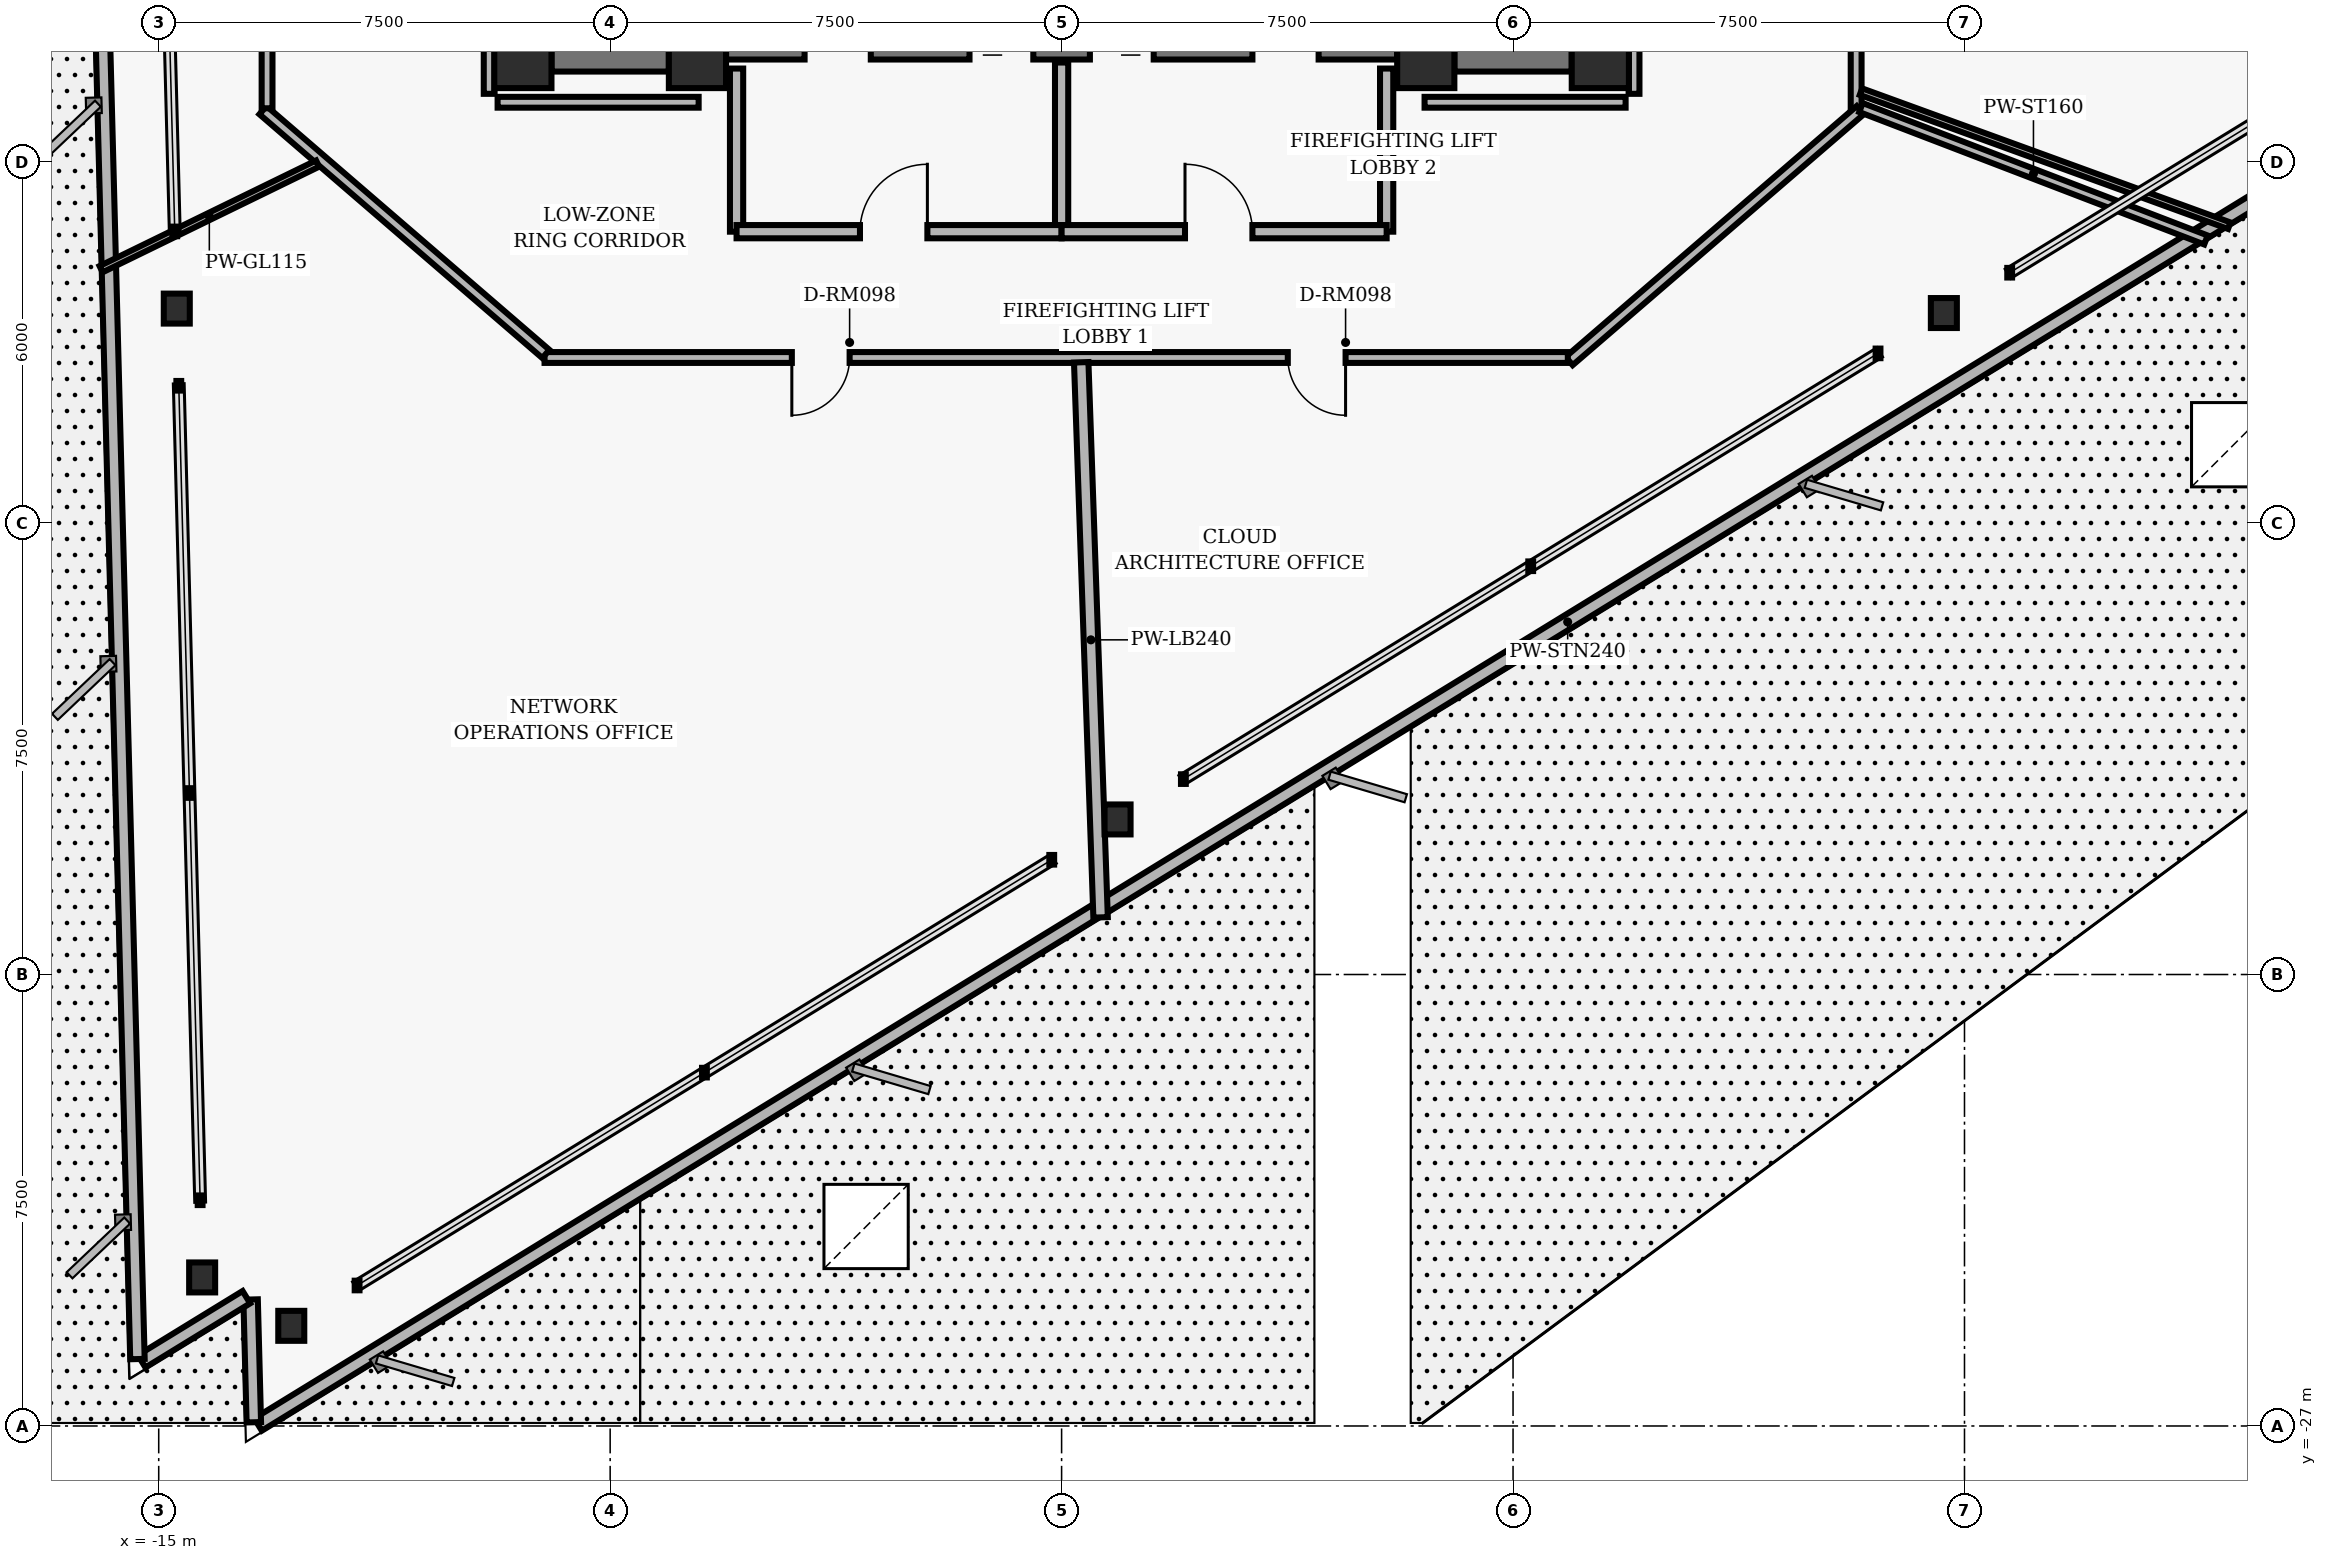
"""IFC4 building model, lengths in metres.
Left out: names, types, materials, properties, quantities, classifications, styles, units other than length and angle.
Written with IfcOpenShell. Run it as: python <this file> out.ifc"""

import sys

from ifc_helpers import new_model, si_unit, direction, frame, frame_2d, origin, origin_2d, place, context, subcontext, project, spatial, rectangle, hollow_rectangle, i_section, extrude, element, fill, save


model = new_model("IFC4")
c1 = context("Model", 3, precision=1e-05, world=origin(), true_north=direction((0.0, 1.0)))
c2 = subcontext(c1, "Body", "Model", "MODEL_VIEW")
j1 = project(units=[si_unit("LENGTHUNIT", "METRE"), si_unit("PLANEANGLEUNIT", "RADIAN")], contexts=[c1])
p1 = place(None, origin())
s1 = spatial("IfcSite", under=j1, at=p1, CompositionType="ELEMENT")
p2 = place(p1, origin())
s2 = spatial("IfcBuilding", under=s1, at=p2, CompositionType="ELEMENT")
p3 = place(p2, frame((0.0, 0.0, 18.88)))
s3 = spatial("IfcBuildingStorey", under=s2, at=p3, CompositionType="ELEMENT", Elevation=18.88)
for number, where, z_axis, x_axis in (
    (1, (-6.05, -4.3, 0.0), (0.0, 0.0, 1.0), (1.0, 0.0, 0.0)),
    (2, (6.05, -4.3, 0.0), (0.0, 0.0, 1.0), (1.0, 0.0, 0.0)),
    (3, (-8.95, -4.3, 0.0), (0.0, 0.0, 1.0), (1.0, 0.0, 0.0)),
    (4, (8.95, -4.3, 0.0), (0.0, 0.0, 1.0), (1.0, 0.0, 0.0)),
):
    element("IfcColumn", number, at=place(p3, frame(where, z_axis=z_axis, x_axis=x_axis)), inside=s3, PredefinedType="COLUMN", context=c2, shape_type="SweptSolid", body=[
        extrude(hollow_rectangle(XDim=0.95, YDim=0.95, WallThickness=0.06, InnerFilletRadius=0.02, OuterFilletRadius=0.04, at=origin_2d()), origin(), (0.0, 0.0, 1.0), 3.36),
    ])
p4 = place(p3, frame((-5.575, -4.1, 0.0), z_axis=(0.0, 0.0, 1.0), x_axis=(1.0, 0.0, 0.0)))
e5 = element("IfcWall", 5, at=p4, inside=s3, PredefinedType="SHEAR", context=c2, shape_type="SweptSolid", body=[
    extrude(rectangle(XDim=11.15, YDim=0.4, at=frame_2d((5.575, 0.0))), origin(), (0.0, 0.0, 1.0), 3.098),
])
p5 = place(p4, frame((1.305, 0.0, 0.0)))
e6 = element("IfcOpeningElement", 6, at=p5, cuts=e5, PredefinedType="OPENING", context=c2, shape_type="SweptSolid", body=[
    extrude(rectangle(XDim=1.1, YDim=2.04, at=frame_2d((0.55, 1.02))), frame((0.0, 0.21, 0.0), z_axis=(0.0, -1.0, 0.0), x_axis=(1.0, 0.0, 0.0)), (0.0, 0.0, 1.0), 0.42),
])
p6 = place(p4, frame((8.745, 0.0, 0.0)))
e7 = element("IfcOpeningElement", 7, at=p6, cuts=e5, PredefinedType="OPENING", context=c2, shape_type="SweptSolid", body=[
    extrude(rectangle(XDim=1.1, YDim=2.04, at=frame_2d((0.55, 1.02))), frame((0.0, 0.21, 0.0), z_axis=(0.0, -1.0, 0.0), x_axis=(1.0, 0.0, 0.0)), (0.0, 0.0, 1.0), 0.42),
])
p7 = place(p4, frame((4.045, 0.0, 0.0)))
e8 = element("IfcOpeningElement", 8, at=p7, cuts=e5, PredefinedType="OPENING", context=c2, shape_type="SweptSolid", body=[
    extrude(rectangle(XDim=1.06, YDim=2.04, at=frame_2d((0.53, 1.02))), frame((0.0, 0.21, 0.0), z_axis=(0.0, -1.0, 0.0), x_axis=(1.0, 0.0, 0.0)), (0.0, 0.0, 1.0), 0.42),
])
p8 = place(p4, frame((6.045, 0.0, 0.0)))
e9 = element("IfcOpeningElement", 9, at=p8, cuts=e5, PredefinedType="OPENING", context=c2, shape_type="SweptSolid", body=[
    extrude(rectangle(XDim=1.06, YDim=2.04, at=frame_2d((0.53, 1.02))), frame((0.0, 0.21, 0.0), z_axis=(0.0, -1.0, 0.0), x_axis=(1.0, 0.0, 0.0)), (0.0, 0.0, 1.0), 0.42),
])
for number, where, z_axis, x_axis in (
    (10, (-8.475, -4.3, 0.0), (0.0, 0.0, 1.0), (1.0, 0.0, 0.0)),
    (11, (6.525, -4.3, 0.0), (0.0, 0.0, 1.0), (1.0, 0.0, 0.0)),
):
    element("IfcWall", number, at=place(p3, frame(where, z_axis=z_axis, x_axis=x_axis)), inside=s3, PredefinedType="SHEAR", context=c2, shape_type="SweptSolid", body=[
        extrude(rectangle(XDim=1.95, YDim=0.4, at=frame_2d((0.975, 0.0))), origin(), (0.0, 0.0, 1.0), 3.098),
    ])
for number, where, z_axis, x_axis in (
    (12, (-14.7, -8.438, 0.0), (0.0, 0.0, 1.0), (1.0, 0.0, 0.0)),
    (13, (-14.279, -24.532, 0.0), (0.0, 0.0, 1.0), (1.0, 0.0, 0.0)),
    (14, (-12.798, -25.336, 0.0), (0.0, 0.0, 1.0), (1.0, 0.0, 0.0)),
    (15, (0.93, -16.924, 0.0), (0.0, 0.0, 1.0), (1.0, 0.0, 0.0)),
    (16, (14.657, -8.512, 0.0), (0.0, 0.0, 1.0), (1.0, 0.0, 0.0)),
):
    element("IfcColumn", number, at=place(p3, frame(where, z_axis=z_axis, x_axis=x_axis)), inside=s3, PredefinedType="COLUMN", context=c2, shape_type="SweptSolid", body=[
        extrude(i_section(OverallWidth=0.432, OverallDepth=0.498, WebThickness=0.056, FlangeThickness=0.089, FilletRadius=0.025, at=origin_2d()), origin(), (0.0, 0.0, 1.0), 3.36),
    ])
p9 = place(p3, frame((30.165, -0.311, 0.0), z_axis=(0.0, 0.0, 1.0), x_axis=(-0.852639202063, -0.522500135029, 0.0)))
e17 = element("IfcWall", 17, at=p9, inside=s3, PredefinedType="PARAPET", context=c2, shape_type="SweptSolid", body=[
    extrude(rectangle(XDim=51.035, YDim=0.24, at=frame_2d((25.518, 0.0))), origin(), (0.0, 0.0, 1.0), 1.65),
])
for number, where, z_axis, x_axis in (
    (18, (-13.42, -26.938, 0.0), (0.0, 0.0, 1.0), (-0.026, 1.0, 0.0)),
    (19, (-13.544, -24.861, 0.0), (0.0, 0.0, 1.0), (-0.853, -0.522, 0.0)),
):
    element("IfcWall", number, at=place(p3, frame(where, z_axis=z_axis, x_axis=x_axis)), inside=s3, PredefinedType="PARAPET", context=c2, shape_type="SweptSolid", body=[
        extrude(rectangle(XDim=2.04, YDim=0.24, at=frame_2d((1.02, 0.0))), origin(), (0.0, 0.0, 1.0), 1.65),
    ])
p10 = place(p3, frame((-15.354, -25.888, 0.0), z_axis=(0.0, 0.0, 1.0), x_axis=(-0.026174886222, 0.999657378971, 0.0)))
e20 = element("IfcWall", 20, at=p10, inside=s3, PredefinedType="PARAPET", context=c2, shape_type="SweptSolid", body=[
    extrude(rectangle(XDim=50.955, YDim=0.24, at=frame_2d((25.478, 0.0))), origin(), (0.0, 0.0, 1.0), 1.65),
])
for number, where, z_axis, x_axis in (
    (21, (-5.4, -7.16, 0.0), (0.0, 0.0, 1.0), (0.0, 1.0, 0.0)),
    (22, (5.4, -7.16, 0.0), (0.0, 0.0, 1.0), (0.0, 1.0, 0.0)),
):
    element("IfcWall", number, at=place(p3, frame(where, z_axis=z_axis, x_axis=x_axis)), inside=s3, PredefinedType="PARTITIONING", context=c2, shape_type="SweptSolid", body=[
        extrude(rectangle(XDim=2.71, YDim=0.22, at=frame_2d((1.355, 0.0))), origin(), (0.0, 0.0, 1.0), 3.073),
    ])
p11 = place(p3, frame((0.0, -7.16, 0.0), z_axis=(0.0, 0.0, 1.0), x_axis=(0.0, 1.0, 0.0)))
e23 = element("IfcWall", 23, at=p11, inside=s3, PredefinedType="PARTITIONING", context=c2, shape_type="SweptSolid", body=[
    extrude(rectangle(XDim=2.81, YDim=0.22, at=frame_2d((1.405, 0.0))), origin(), (0.0, 0.0, 1.0), 3.073),
])
p12 = place(p3, frame((-5.4, -7.16, 0.0), z_axis=(0.0, 0.0, 1.0), x_axis=(1.0, 0.0, 0.0)))
e24 = element("IfcWall", 24, at=p12, inside=s3, PredefinedType="PARTITIONING", context=c2, shape_type="SweptSolid", body=[
    extrude(rectangle(XDim=5.4, YDim=0.22, at=frame_2d((2.7, 0.0))), origin(), (0.0, 0.0, 1.0), 3.073),
])
p13 = place(p12, frame((2.05, 0.0, 0.0)))
e25 = element("IfcOpeningElement", 25, at=p13, cuts=e24, PredefinedType="OPENING", context=c2, shape_type="SweptSolid", body=[
    extrude(rectangle(XDim=1.12, YDim=2.02, at=frame_2d((0.56, 1.01))), frame((0.0, 0.12, 0.0), z_axis=(0.0, -1.0, 0.0), x_axis=(1.0, 0.0, 0.0)), (0.0, 0.0, 1.0), 0.24),
])
p14 = place(p3, frame((0.0, -7.16, 0.0), z_axis=(0.0, 0.0, 1.0), x_axis=(1.0, 0.0, 0.0)))
e26 = element("IfcWall", 26, at=p14, inside=s3, PredefinedType="PARTITIONING", context=c2, shape_type="SweptSolid", body=[
    extrude(rectangle(XDim=5.4, YDim=0.22, at=frame_2d((2.7, 0.0))), origin(), (0.0, 0.0, 1.0), 3.073),
])
p15 = place(p14, frame((2.05, 0.0, 0.0)))
e27 = element("IfcOpeningElement", 27, at=p15, cuts=e26, PredefinedType="OPENING", context=c2, shape_type="SweptSolid", body=[
    extrude(rectangle(XDim=1.12, YDim=2.02, at=frame_2d((0.56, 1.01))), frame((0.0, 0.12, 0.0), z_axis=(0.0, -1.0, 0.0), x_axis=(1.0, 0.0, 0.0)), (0.0, 0.0, 1.0), 0.24),
])
p16 = place(p3, frame((13.2, 5.11, 0.0), z_axis=(0.0, 0.0, 1.0), x_axis=(0.0, -1.0, 0.0)))
e28 = element("IfcWall", 28, at=p16, inside=s3, PredefinedType="PARTITIONING", context=c2, shape_type="SweptSolid", body=[
    extrude(rectangle(XDim=10.22, YDim=0.18, at=frame_2d((5.11, 0.0))), origin(), (0.0, 0.0, 1.0), 3.073),
])
p17 = place(p16, frame((4.591, 0.0, 0.0)))
e29 = element("IfcOpeningElement", 29, at=p17, cuts=e28, PredefinedType="OPENING", context=c2, shape_type="SweptSolid", body=[
    extrude(rectangle(XDim=1.02, YDim=2.02, at=frame_2d((0.51, 1.01))), frame((0.0, 0.1, 0.0), z_axis=(0.0, -1.0, 0.0), x_axis=(1.0, 0.0, 0.0)), (0.0, 0.0, 1.0), 0.2),
])
p18 = place(p3, frame((13.268, -5.141, 0.0), z_axis=(0.0, 0.0, 1.0), x_axis=(-0.757534501725, -0.65279512766, 0.0)))
e30 = element("IfcWall", 30, at=p18, inside=s3, PredefinedType="PARTITIONING", context=c2, shape_type="SweptSolid", body=[
    extrude(rectangle(XDim=6.385, YDim=0.18, at=frame_2d((3.192, 0.0))), origin(), (0.0, 0.0, 1.0), 2.587),
])
p19 = place(p3, frame((8.41, -9.25, 0.0), z_axis=(0.0, 0.0, 1.0), x_axis=(-1.0, 0.0, 0.0)))
e31 = element("IfcWall", 31, at=p19, inside=s3, PredefinedType="PARTITIONING", context=c2, shape_type="SweptSolid", body=[
    extrude(rectangle(XDim=17.0, YDim=0.18, at=frame_2d((8.5, 0.0))), origin(), (0.0, 0.0, 1.0), 2.587),
])
p20 = place(p19, frame((11.932, 0.0, 0.0)))
e32 = element("IfcOpeningElement", 32, at=p20, cuts=e31, PredefinedType="OPENING", context=c2, shape_type="SweptSolid", body=[
    extrude(rectangle(XDim=0.96, YDim=2.02, at=frame_2d((0.48, 1.01))), frame((0.0, 0.1, 0.0), z_axis=(0.0, -1.0, 0.0), x_axis=(1.0, 0.0, 0.0)), (0.0, 0.0, 1.0), 0.2),
])
p21 = place(p19, frame((3.692, 0.0, 0.0)))
e33 = element("IfcOpeningElement", 33, at=p21, cuts=e31, PredefinedType="OPENING", context=c2, shape_type="SweptSolid", body=[
    extrude(rectangle(XDim=0.96, YDim=2.02, at=frame_2d((0.48, 1.01))), frame((0.0, 0.1, 0.0), z_axis=(0.0, -1.0, 0.0), x_axis=(1.0, 0.0, 0.0)), (0.0, 0.0, 1.0), 0.2),
])
p22 = place(p3, frame((-8.568, -9.191, 0.0), z_axis=(0.0, 0.0, 1.0), x_axis=(-0.757556899173, 0.652769135694, 0.0)))
e34 = element("IfcWall", 34, at=p22, inside=s3, PredefinedType="PARTITIONING", context=c2, shape_type="SweptSolid", body=[
    extrude(rectangle(XDim=6.204, YDim=0.18, at=frame_2d((3.102, 0.0))), origin(), (0.0, 0.0, 1.0), 3.073),
])
p23 = place(p3, frame((-13.2, -5.11, 0.0), z_axis=(0.0, 0.0, 1.0), x_axis=(0.0, 1.0, 0.0)))
e35 = element("IfcWall", 35, at=p23, inside=s3, PredefinedType="PARTITIONING", context=c2, shape_type="SweptSolid", body=[
    extrude(rectangle(XDim=10.22, YDim=0.18, at=frame_2d((5.11, 0.0))), origin(), (0.0, 0.0, 1.0), 2.587),
])
p24 = place(p23, frame((4.361, 0.0, 0.0)))
e36 = element("IfcOpeningElement", 36, at=p24, cuts=e35, PredefinedType="OPENING", context=c2, shape_type="SweptSolid", body=[
    extrude(rectangle(XDim=0.96, YDim=2.02, at=frame_2d((0.48, 1.01))), frame((0.0, 0.1, 0.0), z_axis=(0.0, -1.0, 0.0), x_axis=(1.0, 0.0, 0.0)), (0.0, 0.0, 1.0), 0.2),
])
p25 = place(p3, frame((-9.51, -4.05, 0.0), z_axis=(0.0, 0.0, 1.0), x_axis=(0.0, -1.0, 0.0)))
e37 = element("IfcWall", 37, at=p25, inside=s3, PredefinedType="PARTITIONING", context=c2, shape_type="SweptSolid", body=[
    extrude(rectangle(XDim=0.82, YDim=0.18, at=frame_2d((0.41, 0.0))), origin(), (0.0, 0.0, 1.0), 2.358),
])
for number, where, z_axis, x_axis in (
    (38, (-9.37, -5.01, 0.0), (0.0, 0.0, 1.0), (1.0, 0.0, 0.0)),
    (39, (6.03, -5.01, 0.0), (0.0, 0.0, 1.0), (1.0, 0.0, 0.0)),
):
    element("IfcWall", number, at=place(p3, frame(where, z_axis=z_axis, x_axis=x_axis)), inside=s3, PredefinedType="PARTITIONING", context=c2, shape_type="SweptSolid", body=[
        extrude(rectangle(XDim=3.34, YDim=0.18, at=frame_2d((1.67, 0.0))), origin(), (0.0, 0.0, 1.0), 3.073),
    ])
p26 = place(p3, frame((9.51, -4.87, 0.0), z_axis=(0.0, 0.0, 1.0), x_axis=(0.0, 1.0, 0.0)))
e40 = element("IfcWall", 40, at=p26, inside=s3, PredefinedType="PARTITIONING", context=c2, shape_type="SweptSolid", body=[
    extrude(rectangle(XDim=9.74, YDim=0.18, at=frame_2d((4.87, 0.0))), origin(), (0.0, 0.0, 1.0), 3.073),
])
p27 = place(p3, frame((-12.361, -6.029, 0.0), z_axis=(0.0, 0.0, 1.0), x_axis=(-0.898800692661, -0.438357519466, 0.0)))
e41 = element("IfcWall", 41, at=p27, inside=s3, PredefinedType="MOVABLE", context=c2, shape_type="SweptSolid", body=[
    extrude(rectangle(XDim=4.002, YDim=0.115, at=frame_2d((2.001, 0.0))), origin(), (0.0, 0.0, 1.0), 3.073),
])
p28 = place(p3, frame((0.326, -9.33, 0.0), z_axis=(0.0, 0.0, 1.0), x_axis=(0.034901543767, -0.999390755532, 0.0)))
e42 = element("IfcWall", 42, at=p28, inside=s3, PredefinedType="PARTITIONING", context=c2, shape_type="SweptSolid", body=[
    extrude(rectangle(XDim=9.227, YDim=0.24, at=frame_2d((4.613, 0.0))), origin(), (0.0, 0.0, 1.0), 3.073),
])
p29 = place(p3, frame((13.28, -5.098, 0.0), z_axis=(0.0, 0.0, 1.0), x_axis=(0.933574999212, -0.358382087787, 0.0)))
e43 = element("IfcWall", 43, at=p29, inside=s3, PredefinedType="PARTITIONING", context=c2, shape_type="SweptSolid", body=[
    extrude(rectangle(XDim=6.139, YDim=0.16, at=frame_2d((3.07, 0.0))), origin(), (0.0, 0.0, 1.0), 3.073),
])
p30 = place(p3, frame((13.28, -4.833, 0.0), z_axis=(0.0, 0.0, 1.0), x_axis=(0.939690475906, -0.342026036278, 0.0)))
e44 = element("IfcWall", 44, at=p30, inside=s3, PredefinedType="MOVABLE", context=c2, shape_type="SweptSolid", body=[
    extrude(rectangle(XDim=6.511, YDim=0.115, at=frame_2d((3.256, 0.0))), origin(), (0.0, 0.0, 1.0), 3.073),
])
p31 = place(p3, frame((0.0, 0.0, -0.26)))
p32 = place(p31, frame((19.472, -10.699, 0.0)))
p33 = place(p32, frame((0.0, 0.0, 0.21)))
e45 = element("IfcWindow", 45, at=p33, inside=s3, PartitioningType="SINGLE_PANEL", PredefinedType="SKYLIGHT", context=c2, shape_type="SweptSolid", body=[
    extrude(rectangle(XDim=1.4, YDim=1.4, at=origin_2d()), origin(), (0.0, 0.0, 1.0), 0.05),
])
p34 = place(p3, frame((0.0, 0.0, -0.23)))
p35 = place(p34, frame((-3.248, -23.686, 0.0)))
p36 = place(p35, frame((0.0, 0.0, 0.18)))
e46 = element("IfcWindow", 46, at=p36, inside=s3, PartitioningType="SINGLE_PANEL", PredefinedType="SKYLIGHT", context=c2, shape_type="SweptSolid", body=[
    extrude(rectangle(XDim=1.4, YDim=1.4, at=origin_2d()), origin(), (0.0, 0.0, 1.0), 0.05),
])
p37 = place(p13, origin())
e47 = element("IfcDoor", 47, at=p37, inside=s3, OperationType="SINGLE_SWING_RIGHT", PredefinedType="DOOR", context=c2, shape_type="SweptSolid", body=[
    extrude(rectangle(XDim=1.12, YDim=2.02, at=frame_2d((0.56, 1.01))), frame((0.0, 0.025, 0.0), z_axis=(0.0, -1.0, 0.0), x_axis=(1.0, 0.0, 0.0)), (0.0, 0.0, 1.0), 0.05),
])
fill(e25, e47)
p38 = place(p15, origin())
e48 = element("IfcDoor", 48, at=p38, inside=s3, OperationType="SINGLE_SWING_LEFT", PredefinedType="DOOR", context=c2, shape_type="SweptSolid", body=[
    extrude(rectangle(XDim=1.12, YDim=2.02, at=frame_2d((0.56, 1.01))), frame((0.0, 0.025, 0.0), z_axis=(0.0, -1.0, 0.0), x_axis=(1.0, 0.0, 0.0)), (0.0, 0.0, 1.0), 0.05),
])
fill(e27, e48)
p39 = place(p20, origin())
e49 = element("IfcDoor", 49, at=p39, inside=s3, OperationType="SINGLE_SWING_RIGHT", PredefinedType="DOOR", context=c2, shape_type="SweptSolid", body=[
    extrude(rectangle(XDim=0.96, YDim=2.02, at=frame_2d((0.48, 1.01))), frame((0.0, 0.025, 0.0), z_axis=(0.0, -1.0, 0.0), x_axis=(1.0, 0.0, 0.0)), (0.0, 0.0, 1.0), 0.05),
])
fill(e32, e49)
p40 = place(p21, origin())
e50 = element("IfcDoor", 50, at=p40, inside=s3, OperationType="SINGLE_SWING_LEFT", PredefinedType="DOOR", context=c2, shape_type="SweptSolid", body=[
    extrude(rectangle(XDim=0.96, YDim=2.02, at=frame_2d((0.48, 1.01))), frame((0.0, 0.025, 0.0), z_axis=(0.0, -1.0, 0.0), x_axis=(1.0, 0.0, 0.0)), (0.0, 0.0, 1.0), 0.05),
])
fill(e33, e50)
save(model, sys.argv[1])
